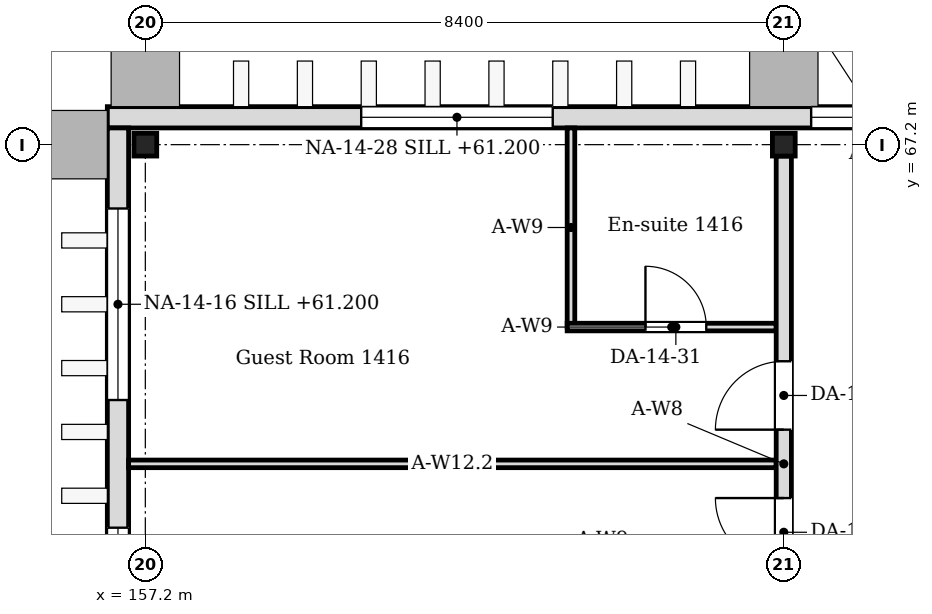
"""IFC4 building model, lengths in metres.
Left out: names, types, materials, properties, quantities, classifications, styles, units other than length and angle.
Written with IfcOpenShell. Run it as: python <this file> out.ifc"""

import sys

from ifc_helpers import new_model, si_unit, direction, frame, frame_2d, origin, origin_2d, place, context, subcontext, project, spatial, rectangle, i_section, extrude, element, fill, save


model = new_model("IFC4")
c1 = context("Model", 3, precision=1e-05, world=origin(), true_north=direction((0.0, 1.0)))
c2 = subcontext(c1, "Body", "Model", "MODEL_VIEW")
j1 = project(units=[si_unit("LENGTHUNIT", "METRE"), si_unit("PLANEANGLEUNIT", "RADIAN")], contexts=[c1])
p1 = place(None, origin())
s1 = spatial("IfcSite", under=j1, at=p1, CompositionType="ELEMENT")
p2 = place(p1, origin())
s2 = spatial("IfcBuilding", under=s1, at=p2, CompositionType="ELEMENT")
p3 = place(p2, frame((0.0, 0.0, 60.6)))
s3 = spatial("IfcBuildingStorey", under=s2, at=p3, CompositionType="ELEMENT", Elevation=60.6)
for number, where, z_axis, x_axis in (
    (1, (157.2, 67.2, 0.0), (0.0, 0.0, 1.0), (1.0, 0.0, 0.0)),
    (2, (165.6, 67.2, 0.0), (0.0, 0.0, 1.0), (1.0, 0.0, 0.0)),
):
    element("IfcColumn", number, at=place(p3, frame(where, z_axis=z_axis, x_axis=x_axis)), inside=s3, PredefinedType="COLUMN", context=c2, shape_type="SweptSolid", body=[
        extrude(i_section(OverallWidth=0.3, OverallDepth=0.3, WebThickness=0.01, FlangeThickness=0.015, FilletRadius=0.013, at=origin_2d()), origin(), (0.0, 0.0, 1.0), 4.2),
    ])
p4 = place(p3, frame((156.84, -0.22, 0.0), z_axis=(0.0, 0.0, 1.0), x_axis=(0.0, 1.0, 0.0)))
e3 = element("IfcWall", 3, at=p4, inside=s3, PredefinedType="SOLIDWALL", context=c2, shape_type="SweptSolid", body=[
    extrude(rectangle(XDim=67.64, YDim=0.28, at=frame_2d((33.82, 0.0))), origin(), (0.0, 0.0, 1.0), 4.05),
])
p5 = place(p4, frame((0.64, 0.0, 0.6)))
e4 = element("IfcOpeningElement", 4, at=p5, cuts=e3, PredefinedType="OPENING", context=c2, shape_type="SweptSolid", body=[
    extrude(rectangle(XDim=2.52, YDim=2.4, at=frame_2d((1.26, 1.2))), frame((0.0, 0.15, 0.0), z_axis=(0.0, -1.0, 0.0), x_axis=(1.0, 0.0, 0.0)), (0.0, 0.0, 1.0), 0.3),
])
p6 = place(p4, frame((4.84, 0.0, 0.6)))
e5 = element("IfcOpeningElement", 5, at=p6, cuts=e3, PredefinedType="OPENING", context=c2, shape_type="SweptSolid", body=[
    extrude(rectangle(XDim=2.52, YDim=2.4, at=frame_2d((1.26, 1.2))), frame((0.0, 0.15, 0.0), z_axis=(0.0, -1.0, 0.0), x_axis=(1.0, 0.0, 0.0)), (0.0, 0.0, 1.0), 0.3),
])
p7 = place(p4, frame((9.46, 0.0, 0.6)))
e6 = element("IfcOpeningElement", 6, at=p7, cuts=e3, PredefinedType="OPENING", context=c2, shape_type="SweptSolid", body=[
    extrude(rectangle(XDim=2.52, YDim=2.4, at=frame_2d((1.26, 1.2))), frame((0.0, 0.15, 0.0), z_axis=(0.0, -1.0, 0.0), x_axis=(1.0, 0.0, 0.0)), (0.0, 0.0, 1.0), 0.3),
])
p8 = place(p4, frame((13.66, 0.0, 0.6)))
e7 = element("IfcOpeningElement", 7, at=p8, cuts=e3, PredefinedType="OPENING", context=c2, shape_type="SweptSolid", body=[
    extrude(rectangle(XDim=2.52, YDim=2.4, at=frame_2d((1.26, 1.2))), frame((0.0, 0.15, 0.0), z_axis=(0.0, -1.0, 0.0), x_axis=(1.0, 0.0, 0.0)), (0.0, 0.0, 1.0), 0.3),
])
p9 = place(p4, frame((17.86, 0.0, 0.6)))
e8 = element("IfcOpeningElement", 8, at=p9, cuts=e3, PredefinedType="OPENING", context=c2, shape_type="SweptSolid", body=[
    extrude(rectangle(XDim=2.52, YDim=2.4, at=frame_2d((1.26, 1.2))), frame((0.0, 0.15, 0.0), z_axis=(0.0, -1.0, 0.0), x_axis=(1.0, 0.0, 0.0)), (0.0, 0.0, 1.0), 0.3),
])
p10 = place(p4, frame((22.06, 0.0, 0.6)))
e9 = element("IfcOpeningElement", 9, at=p10, cuts=e3, PredefinedType="OPENING", context=c2, shape_type="SweptSolid", body=[
    extrude(rectangle(XDim=2.52, YDim=2.4, at=frame_2d((1.26, 1.2))), frame((0.0, 0.15, 0.0), z_axis=(0.0, -1.0, 0.0), x_axis=(1.0, 0.0, 0.0)), (0.0, 0.0, 1.0), 0.3),
])
p11 = place(p4, frame((25.84, 0.0, 0.6)))
e10 = element("IfcOpeningElement", 10, at=p11, cuts=e3, PredefinedType="OPENING", context=c2, shape_type="SweptSolid", body=[
    extrude(rectangle(XDim=2.52, YDim=2.4, at=frame_2d((1.26, 1.2))), frame((0.0, 0.15, 0.0), z_axis=(0.0, -1.0, 0.0), x_axis=(1.0, 0.0, 0.0)), (0.0, 0.0, 1.0), 0.3),
])
p12 = place(p4, frame((30.04, 0.0, 0.6)))
e11 = element("IfcOpeningElement", 11, at=p12, cuts=e3, PredefinedType="OPENING", context=c2, shape_type="SweptSolid", body=[
    extrude(rectangle(XDim=2.52, YDim=2.4, at=frame_2d((1.26, 1.2))), frame((0.0, 0.15, 0.0), z_axis=(0.0, -1.0, 0.0), x_axis=(1.0, 0.0, 0.0)), (0.0, 0.0, 1.0), 0.3),
])
p13 = place(p4, frame((34.66, 0.0, 0.6)))
e12 = element("IfcOpeningElement", 12, at=p13, cuts=e3, PredefinedType="OPENING", context=c2, shape_type="SweptSolid", body=[
    extrude(rectangle(XDim=2.52, YDim=2.4, at=frame_2d((1.26, 1.2))), frame((0.0, 0.15, 0.0), z_axis=(0.0, -1.0, 0.0), x_axis=(1.0, 0.0, 0.0)), (0.0, 0.0, 1.0), 0.3),
])
p14 = place(p4, frame((38.86, 0.0, 0.6)))
e13 = element("IfcOpeningElement", 13, at=p14, cuts=e3, PredefinedType="OPENING", context=c2, shape_type="SweptSolid", body=[
    extrude(rectangle(XDim=2.52, YDim=2.4, at=frame_2d((1.26, 1.2))), frame((0.0, 0.15, 0.0), z_axis=(0.0, -1.0, 0.0), x_axis=(1.0, 0.0, 0.0)), (0.0, 0.0, 1.0), 0.3),
])
p15 = place(p4, frame((42.64, 0.0, 0.6)))
e14 = element("IfcOpeningElement", 14, at=p15, cuts=e3, PredefinedType="OPENING", context=c2, shape_type="SweptSolid", body=[
    extrude(rectangle(XDim=2.52, YDim=2.4, at=frame_2d((1.26, 1.2))), frame((0.0, 0.15, 0.0), z_axis=(0.0, -1.0, 0.0), x_axis=(1.0, 0.0, 0.0)), (0.0, 0.0, 1.0), 0.3),
])
p16 = place(p4, frame((46.84, 0.0, 0.6)))
e15 = element("IfcOpeningElement", 15, at=p16, cuts=e3, PredefinedType="OPENING", context=c2, shape_type="SweptSolid", body=[
    extrude(rectangle(XDim=2.52, YDim=2.4, at=frame_2d((1.26, 1.2))), frame((0.0, 0.15, 0.0), z_axis=(0.0, -1.0, 0.0), x_axis=(1.0, 0.0, 0.0)), (0.0, 0.0, 1.0), 0.3),
])
p17 = place(p4, frame((51.46, 0.0, 0.6)))
e16 = element("IfcOpeningElement", 16, at=p17, cuts=e3, PredefinedType="OPENING", context=c2, shape_type="SweptSolid", body=[
    extrude(rectangle(XDim=2.52, YDim=2.4, at=frame_2d((1.26, 1.2))), frame((0.0, 0.15, 0.0), z_axis=(0.0, -1.0, 0.0), x_axis=(1.0, 0.0, 0.0)), (0.0, 0.0, 1.0), 0.3),
])
p18 = place(p4, frame((55.66, 0.0, 0.6)))
e17 = element("IfcOpeningElement", 17, at=p18, cuts=e3, PredefinedType="OPENING", context=c2, shape_type="SweptSolid", body=[
    extrude(rectangle(XDim=2.52, YDim=2.4, at=frame_2d((1.26, 1.2))), frame((0.0, 0.15, 0.0), z_axis=(0.0, -1.0, 0.0), x_axis=(1.0, 0.0, 0.0)), (0.0, 0.0, 1.0), 0.3),
])
p19 = place(p4, frame((59.86, 0.0, 0.6)))
e18 = element("IfcOpeningElement", 18, at=p19, cuts=e3, PredefinedType="OPENING", context=c2, shape_type="SweptSolid", body=[
    extrude(rectangle(XDim=2.52, YDim=2.4, at=frame_2d((1.26, 1.2))), frame((0.0, 0.15, 0.0), z_axis=(0.0, -1.0, 0.0), x_axis=(1.0, 0.0, 0.0)), (0.0, 0.0, 1.0), 0.3),
])
p20 = place(p4, frame((64.06, 0.0, 0.6)))
e19 = element("IfcOpeningElement", 19, at=p20, cuts=e3, PredefinedType="OPENING", context=c2, shape_type="SweptSolid", body=[
    extrude(rectangle(XDim=2.52, YDim=2.4, at=frame_2d((1.26, 1.2))), frame((0.0, 0.15, 0.0), z_axis=(0.0, -1.0, 0.0), x_axis=(1.0, 0.0, 0.0)), (0.0, 0.0, 1.0), 0.3),
])
p21 = place(p3, frame((156.7, 67.56, 0.0), z_axis=(0.0, 0.0, 1.0), x_axis=(1.0, 0.0, 0.0)))
e20 = element("IfcWall", 20, at=p21, inside=s3, PredefinedType="SOLIDWALL", context=c2, shape_type="SweptSolid", body=[
    extrude(rectangle(XDim=20.2, YDim=0.28, at=frame_2d((10.1, 0.0))), origin(), (0.0, 0.0, 1.0), 4.05),
])
p22 = place(p21, frame((9.26, 0.0, 0.6)))
e21 = element("IfcOpeningElement", 21, at=p22, cuts=e20, PredefinedType="OPENING", context=c2, shape_type="SweptSolid", body=[
    extrude(rectangle(XDim=1.68, YDim=2.4, at=frame_2d((0.84, 1.2))), frame((0.0, 0.15, 0.0), z_axis=(0.0, -1.0, 0.0), x_axis=(1.0, 0.0, 0.0)), (0.0, 0.0, 1.0), 0.3),
])
p23 = place(p21, frame((3.34, 0.0, 0.6)))
e22 = element("IfcOpeningElement", 22, at=p23, cuts=e20, PredefinedType="OPENING", context=c2, shape_type="SweptSolid", body=[
    extrude(rectangle(XDim=2.52, YDim=2.4, at=frame_2d((1.26, 1.2))), frame((0.0, 0.15, 0.0), z_axis=(0.0, -1.0, 0.0), x_axis=(1.0, 0.0, 0.0)), (0.0, 0.0, 1.0), 0.3),
])
p24 = place(p3, frame((162.8, 64.8, 0.0), z_axis=(0.0, 0.0, 1.0), x_axis=(0.0, 1.0, 0.0)))
e23 = element("IfcWall", 23, at=p24, inside=s3, PredefinedType="PARTITIONING", context=c2, shape_type="SweptSolid", body=[
    extrude(rectangle(XDim=2.62, YDim=0.1, at=frame_2d((1.31, 0.0))), origin(), (0.0, 0.0, 1.0), 4.05),
])
p25 = place(p3, frame((162.75, 64.8, 0.0), z_axis=(0.0, 0.0, 1.0), x_axis=(1.0, 0.0, 0.0)))
e24 = element("IfcWall", 24, at=p25, inside=s3, PredefinedType="PARTITIONING", context=c2, shape_type="SweptSolid", body=[
    extrude(rectangle(XDim=2.75, YDim=0.1, at=frame_2d((1.375, 0.0))), origin(), (0.0, 0.0, 1.0), 4.05),
])
p26 = place(p25, frame((1.03, 0.0, 0.0)))
e25 = element("IfcOpeningElement", 25, at=p26, cuts=e24, PredefinedType="OPENING", context=c2, shape_type="SweptSolid", body=[
    extrude(rectangle(XDim=0.8, YDim=2.1, at=frame_2d((0.4, 1.05))), frame((0.0, 0.06, 0.0), z_axis=(0.0, -1.0, 0.0), x_axis=(1.0, 0.0, 0.0)), (0.0, 0.0, 1.0), 0.12),
])
p27 = place(p3, frame((156.98, 63.0, 0.0), z_axis=(0.0, 0.0, 1.0), x_axis=(1.0, 0.0, 0.0)))
e26 = element("IfcWall", 26, at=p27, inside=s3, PredefinedType="PARTITIONING", context=c2, shape_type="SweptSolid", body=[
    extrude(rectangle(XDim=8.52, YDim=0.1, at=frame_2d((4.26, 0.0))), origin(), (0.0, 0.0, 1.0), 3.55),
])
p28 = place(p3, frame((165.6, 58.95, 0.0), z_axis=(0.0, 0.0, 1.0), x_axis=(0.0, 1.0, 0.0)))
e27 = element("IfcWall", 27, at=p28, inside=s3, PredefinedType="PARTITIONING", context=c2, shape_type="SweptSolid", body=[
    extrude(rectangle(XDim=8.1, YDim=0.2, at=frame_2d((4.05, 0.0))), origin(), (0.0, 0.0, 1.0), 3.45),
])
p29 = place(p28, frame((2.7, 0.0, 0.0)))
e28 = element("IfcOpeningElement", 28, at=p29, cuts=e27, PredefinedType="OPENING", context=c2, shape_type="SweptSolid", body=[
    extrude(rectangle(XDim=0.9, YDim=2.1, at=frame_2d((0.45, 1.05))), frame((0.0, 0.11, 0.0), z_axis=(0.0, -1.0, 0.0), x_axis=(1.0, 0.0, 0.0)), (0.0, 0.0, 1.0), 0.22),
])
p30 = place(p28, frame((4.5, 0.0, 0.0)))
e29 = element("IfcOpeningElement", 29, at=p30, cuts=e27, PredefinedType="OPENING", context=c2, shape_type="SweptSolid", body=[
    extrude(rectangle(XDim=0.9, YDim=2.1, at=frame_2d((0.45, 1.05))), frame((0.0, 0.11, 0.0), z_axis=(0.0, -1.0, 0.0), x_axis=(1.0, 0.0, 0.0)), (0.0, 0.0, 1.0), 0.22),
])
p31 = place(p19, origin())
e30 = element("IfcWindow", 30, at=p31, inside=s3, PartitioningType="SINGLE_PANEL", PredefinedType="WINDOW", context=c2, shape_type="SweptSolid", body=[
    extrude(rectangle(XDim=2.52, YDim=2.4, at=frame_2d((1.26, 1.2))), frame((0.0, 0.03, 0.0), z_axis=(0.0, -1.0, 0.0), x_axis=(1.0, 0.0, 0.0)), (0.0, 0.0, 1.0), 0.06),
])
fill(e18, e30)
p32 = place(p20, origin())
e31 = element("IfcWindow", 31, at=p32, inside=s3, PartitioningType="SINGLE_PANEL", PredefinedType="WINDOW", context=c2, shape_type="SweptSolid", body=[
    extrude(rectangle(XDim=2.52, YDim=2.4, at=frame_2d((1.26, 1.2))), frame((0.0, 0.03, 0.0), z_axis=(0.0, -1.0, 0.0), x_axis=(1.0, 0.0, 0.0)), (0.0, 0.0, 1.0), 0.06),
])
fill(e19, e31)
p33 = place(p22, origin())
e32 = element("IfcWindow", 32, at=p33, inside=s3, PartitioningType="SINGLE_PANEL", PredefinedType="WINDOW", context=c2, shape_type="SweptSolid", body=[
    extrude(rectangle(XDim=1.68, YDim=2.4, at=frame_2d((0.84, 1.2))), frame((0.0, 0.03, 0.0), z_axis=(0.0, -1.0, 0.0), x_axis=(1.0, 0.0, 0.0)), (0.0, 0.0, 1.0), 0.06),
])
fill(e21, e32)
p34 = place(p23, origin())
e33 = element("IfcWindow", 33, at=p34, inside=s3, PartitioningType="SINGLE_PANEL", PredefinedType="WINDOW", context=c2, shape_type="SweptSolid", body=[
    extrude(rectangle(XDim=2.52, YDim=2.4, at=frame_2d((1.26, 1.2))), frame((0.0, 0.03, 0.0), z_axis=(0.0, -1.0, 0.0), x_axis=(1.0, 0.0, 0.0)), (0.0, 0.0, 1.0), 0.06),
])
fill(e22, e33)
p35 = place(p29, origin())
e34 = element("IfcDoor", 34, at=p35, inside=s3, OperationType="SINGLE_SWING_RIGHT", PredefinedType="DOOR", context=c2, shape_type="SweptSolid", body=[
    extrude(rectangle(XDim=0.9, YDim=2.1, at=frame_2d((0.45, 1.05))), frame((0.0, 0.025, 0.0), z_axis=(0.0, -1.0, 0.0), x_axis=(1.0, 0.0, 0.0)), (0.0, 0.0, 1.0), 0.05),
])
fill(e28, e34)
p36 = place(p26, origin())
e35 = element("IfcDoor", 35, at=p36, inside=s3, OperationType="SINGLE_SWING_LEFT", PredefinedType="DOOR", context=c2, shape_type="SweptSolid", body=[
    extrude(rectangle(XDim=0.8, YDim=2.1, at=frame_2d((0.4, 1.05))), frame((0.0, 0.025, 0.0), z_axis=(0.0, -1.0, 0.0), x_axis=(1.0, 0.0, 0.0)), (0.0, 0.0, 1.0), 0.05),
])
fill(e25, e35)
p37 = place(p30, origin())
e36 = element("IfcDoor", 36, at=p37, inside=s3, OperationType="SINGLE_SWING_LEFT", PredefinedType="DOOR", context=c2, shape_type="SweptSolid", body=[
    extrude(rectangle(XDim=0.9, YDim=2.1, at=frame_2d((0.45, 1.05))), frame((0.0, 0.025, 0.0), z_axis=(0.0, -1.0, 0.0), x_axis=(1.0, 0.0, 0.0)), (0.0, 0.0, 1.0), 0.05),
])
fill(e29, e36)
save(model, sys.argv[1])
